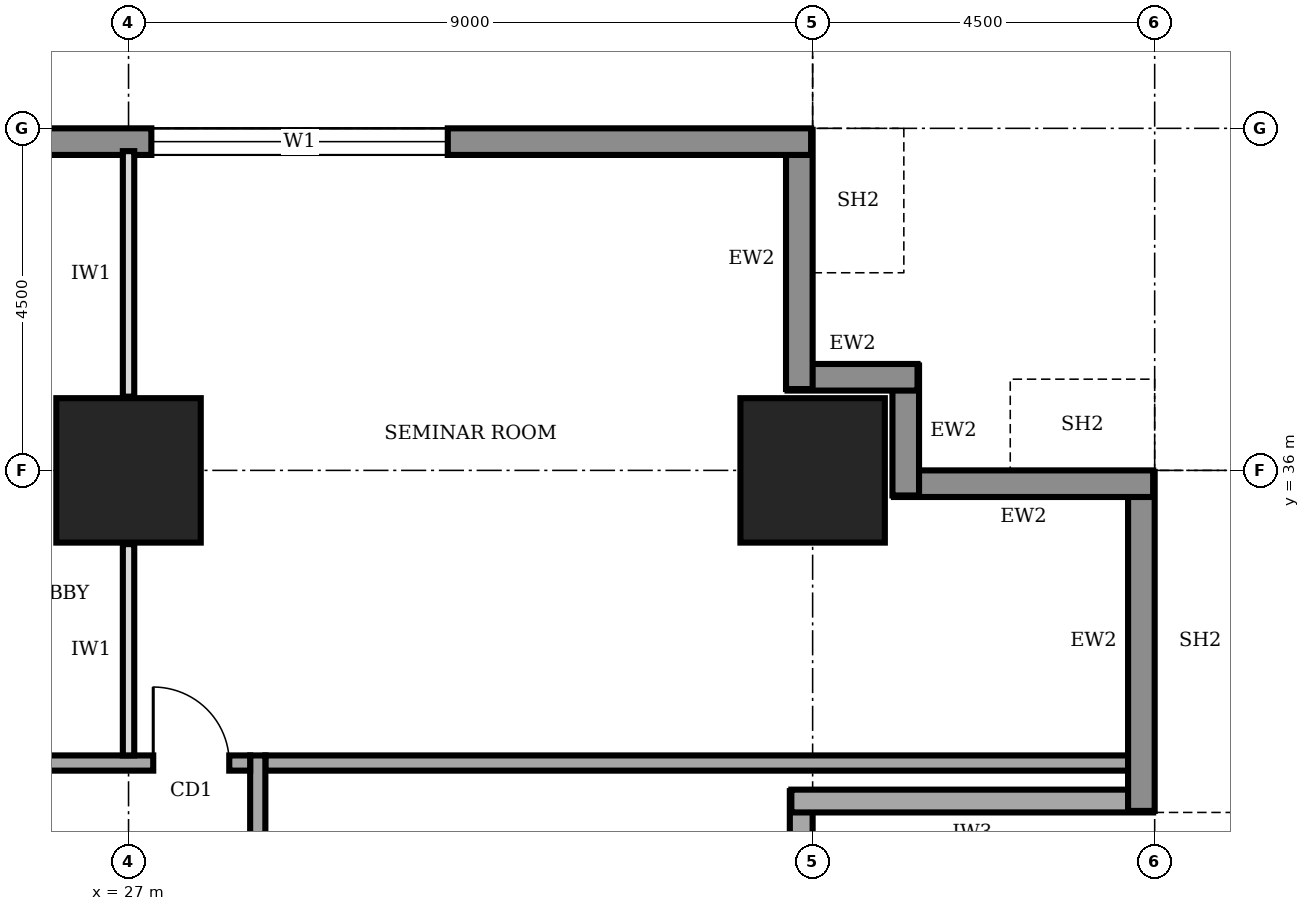
"""IFC4 building model, lengths in metres.
Left out: names, types, materials, properties, quantities, classifications, styles, units other than length and angle.
Written with IfcOpenShell. Run it as: python <this file> out.ifc"""

import sys

from ifc_helpers import new_model, si_unit, direction, frame, frame_2d, origin, origin_2d, place, context, subcontext, project, spatial, rectangle, extrude, element, fill, save


model = new_model("IFC4")
c1 = context("Model", 3, precision=1e-05, world=origin(), true_north=direction((0.0, 1.0)))
c2 = subcontext(c1, "Body", "Model", "MODEL_VIEW")
j1 = project(units=[si_unit("LENGTHUNIT", "METRE"), si_unit("PLANEANGLEUNIT", "RADIAN")], contexts=[c1])
p1 = place(None, origin())
s1 = spatial("IfcSite", under=j1, at=p1, CompositionType="ELEMENT")
p2 = place(p1, origin())
s2 = spatial("IfcBuilding", under=s1, at=p2, CompositionType="ELEMENT")
p3 = place(p2, frame((0.0, 0.0, 113.0)))
s3 = spatial("IfcBuildingStorey", under=s2, at=p3, CompositionType="ELEMENT", Elevation=113.0)
for number, where, z_axis, x_axis in (
    (1, (27.0, 36.0, 0.0), (0.0, 0.0, 1.0), (1.0, 0.0, 0.0)),
    (2, (36.0, 36.0, 0.0), (0.0, 0.0, 1.0), (1.0, 0.0, 0.0)),
):
    element("IfcColumn", number, at=place(p3, frame(where, z_axis=z_axis, x_axis=x_axis)), inside=s3, PredefinedType="COLUMN", context=c2, shape_type="SweptSolid", body=[
        extrude(rectangle(XDim=1.9, YDim=1.9, at=origin_2d()), origin(), (0.0, 0.0, 1.0), 4.0),
    ])
p4 = place(p3, frame((35.85, 30.4, 0.0), z_axis=(0.0, 0.0, 1.0), x_axis=(0.0, 1.0, 0.0)))
e3 = element("IfcWall", 3, at=p4, inside=s3, PredefinedType="SOLIDWALL", context=c2, shape_type="SweptSolid", body=[
    extrude(rectangle(XDim=1.38, YDim=0.3, at=frame_2d((0.69, 0.0))), origin(), (0.0, 0.0, 1.0), 2.65),
])
p5 = place(p3, frame((35.72, 31.65, 0.0), z_axis=(0.0, 0.0, 1.0), x_axis=(1.0, 0.0, 0.0)))
e4 = element("IfcWall", 4, at=p5, inside=s3, PredefinedType="SOLIDWALL", context=c2, shape_type="SweptSolid", body=[
    extrude(rectangle(XDim=4.76, YDim=0.3, at=frame_2d((2.38, 0.0))), origin(), (0.0, 0.0, 1.0), 3.75),
])
p6 = place(p3, frame((40.325, 31.52, 0.0), z_axis=(0.0, 0.0, 1.0), x_axis=(0.0, 1.0, 0.0)))
e5 = element("IfcWall", 5, at=p6, inside=s3, PredefinedType="STANDARD", context=c2, shape_type="SweptSolid", body=[
    extrude(rectangle(XDim=4.46, YDim=0.35, at=frame_2d((2.23, 0.0))), origin(), (0.0, 0.0, 1.0), 3.75),
])
p7 = place(p3, frame((40.48, 35.825, 0.0), z_axis=(0.0, 0.0, 1.0), x_axis=(-1.0, 0.0, 0.0)))
e6 = element("IfcWall", 6, at=p7, inside=s3, PredefinedType="STANDARD", context=c2, shape_type="SweptSolid", body=[
    extrude(rectangle(XDim=3.41, YDim=0.35, at=frame_2d((1.705, 0.0))), origin(), (0.0, 0.0, 1.0), 2.85),
])
for number, where, z_axis, x_axis in (
    (7, (37.225, 35.67, 0.0), (0.0, 0.0, 1.0), (0.0, 1.0, 0.0)),
    (8, (37.38, 37.225, 0.0), (0.0, 0.0, 1.0), (-1.0, 0.0, 0.0)),
):
    element("IfcWall", number, at=place(p3, frame(where, z_axis=z_axis, x_axis=x_axis)), inside=s3, PredefinedType="STANDARD", context=c2, shape_type="SweptSolid", body=[
        extrude(rectangle(XDim=1.71, YDim=0.35, at=frame_2d((0.855, 0.0))), origin(), (0.0, 0.0, 1.0), 3.75),
    ])
p8 = place(p3, frame((35.825, 37.07, 0.0), z_axis=(0.0, 0.0, 1.0), x_axis=(0.0, 1.0, 0.0)))
e9 = element("IfcWall", 9, at=p8, inside=s3, PredefinedType="STANDARD", context=c2, shape_type="SweptSolid", body=[
    extrude(rectangle(XDim=3.41, YDim=0.35, at=frame_2d((1.705, 0.0))), origin(), (0.0, 0.0, 1.0), 2.85),
])
p9 = place(p3, frame((35.98, 40.325, 0.0), z_axis=(0.0, 0.0, 1.0), x_axis=(-1.0, 0.0, 0.0)))
e10 = element("IfcWall", 10, at=p9, inside=s3, PredefinedType="STANDARD", context=c2, shape_type="SweptSolid", body=[
    extrude(rectangle(XDim=31.46, YDim=0.35, at=frame_2d((15.73, 0.0))), origin(), (0.0, 0.0, 1.0), 3.75),
])
p10 = place(p9, frame((27.21, 0.0, 0.9)))
e11 = element("IfcOpeningElement", 11, at=p10, cuts=e10, PredefinedType="OPENING", context=c2, shape_type="SweptSolid", body=[
    extrude(rectangle(XDim=3.9, YDim=2.2, at=frame_2d((1.95, 1.1))), frame((0.0, 0.185, 0.0), z_axis=(0.0, -1.0, 0.0), x_axis=(1.0, 0.0, 0.0)), (0.0, 0.0, 1.0), 0.37),
])
p11 = place(p9, frame((22.78, 0.0, 0.9)))
e12 = element("IfcOpeningElement", 12, at=p11, cuts=e10, PredefinedType="OPENING", context=c2, shape_type="SweptSolid", body=[
    extrude(rectangle(XDim=3.9, YDim=2.2, at=frame_2d((1.95, 1.1))), frame((0.0, 0.185, 0.0), z_axis=(0.0, -1.0, 0.0), x_axis=(1.0, 0.0, 0.0)), (0.0, 0.0, 1.0), 0.37),
])
p12 = place(p9, frame((4.78, 0.0, 0.9)))
e13 = element("IfcOpeningElement", 13, at=p12, cuts=e10, PredefinedType="OPENING", context=c2, shape_type="SweptSolid", body=[
    extrude(rectangle(XDim=3.9, YDim=2.2, at=frame_2d((1.95, 1.1))), frame((0.0, 0.185, 0.0), z_axis=(0.0, -1.0, 0.0), x_axis=(1.0, 0.0, 0.0)), (0.0, 0.0, 1.0), 0.37),
])
p13 = place(p3, frame((28.7, 8.45, 0.0), z_axis=(0.0, 0.0, 1.0), x_axis=(0.0, 1.0, 0.0)))
e14 = element("IfcWall", 14, at=p13, inside=s3, PredefinedType="SOLIDWALL", context=c2, shape_type="SweptSolid", body=[
    extrude(rectangle(XDim=23.8, YDim=0.2, at=frame_2d((11.9, 0.0))), origin(), (0.0, 0.0, 1.0), 3.75),
])
p14 = place(p13, frame((10.9, 0.0, 0.0)))
e15 = element("IfcOpeningElement", 15, at=p14, cuts=e14, PredefinedType="OPENING", context=c2, shape_type="SweptSolid", body=[
    extrude(rectangle(XDim=1.8, YDim=2.1, at=frame_2d((0.9, 1.05))), frame((0.0, 0.11, 0.0), z_axis=(0.0, -1.0, 0.0), x_axis=(1.0, 0.0, 0.0)), (0.0, 0.0, 1.0), 0.22),
])
p15 = place(p3, frame((28.6, 32.15, 0.0), z_axis=(0.0, 0.0, 1.0), x_axis=(-1.0, 0.0, 0.0)))
e16 = element("IfcWall", 16, at=p15, inside=s3, PredefinedType="SOLIDWALL", context=c2, shape_type="SweptSolid", body=[
    extrude(rectangle(XDim=16.9, YDim=0.2, at=frame_2d((8.45, 0.0))), origin(), (0.0, 0.0, 1.0), 3.75),
])
p16 = place(p15, frame((15.425, 0.0, 0.0)))
e17 = element("IfcOpeningElement", 17, at=p16, cuts=e16, PredefinedType="OPENING", context=c2, shape_type="SweptSolid", body=[
    extrude(rectangle(XDim=1.0, YDim=2.1, at=frame_2d((0.5, 1.05))), frame((0.0, 0.11, 0.0), z_axis=(0.0, -1.0, 0.0), x_axis=(1.0, 0.0, 0.0)), (0.0, 0.0, 1.0), 0.22),
])
p17 = place(p15, frame((12.35, 0.0, 0.0)))
e18 = element("IfcOpeningElement", 18, at=p17, cuts=e16, PredefinedType="OPENING", context=c2, shape_type="SweptSolid", body=[
    extrude(rectangle(XDim=1.0, YDim=2.1, at=frame_2d((0.5, 1.05))), frame((0.0, 0.11, 0.0), z_axis=(0.0, -1.0, 0.0), x_axis=(1.0, 0.0, 0.0)), (0.0, 0.0, 1.0), 0.22),
])
p18 = place(p15, frame((5.6, 0.0, 0.0)))
e19 = element("IfcOpeningElement", 19, at=p18, cuts=e16, PredefinedType="OPENING", context=c2, shape_type="SweptSolid", body=[
    extrude(rectangle(XDim=1.0, YDim=2.1, at=frame_2d((0.5, 1.05))), frame((0.0, 0.11, 0.0), z_axis=(0.0, -1.0, 0.0), x_axis=(1.0, 0.0, 0.0)), (0.0, 0.0, 1.0), 0.22),
])
p19 = place(p15, frame((0.275, 0.0, 0.0)))
e20 = element("IfcOpeningElement", 20, at=p19, cuts=e16, PredefinedType="OPENING", context=c2, shape_type="SweptSolid", body=[
    extrude(rectangle(XDim=1.0, YDim=2.1, at=frame_2d((0.5, 1.05))), frame((0.0, 0.11, 0.0), z_axis=(0.0, -1.0, 0.0), x_axis=(1.0, 0.0, 0.0)), (0.0, 0.0, 1.0), 0.22),
])
p20 = place(p3, frame((28.8, 32.15, 0.0), z_axis=(0.0, 0.0, 1.0), x_axis=(1.0, 0.0, 0.0)))
e21 = element("IfcWall", 21, at=p20, inside=s3, PredefinedType="SOLIDWALL", context=c2, shape_type="SweptSolid", body=[
    extrude(rectangle(XDim=11.4, YDim=0.2, at=frame_2d((5.7, 0.0))), origin(), (0.0, 0.0, 1.0), 3.75),
])
p21 = place(p3, frame((27.0, 32.25, 0.0), z_axis=(0.0, 0.0, 1.0), x_axis=(0.0, 1.0, 0.0)))
e22 = element("IfcWall", 22, at=p21, inside=s3, PredefinedType="PARTITIONING", context=c2, shape_type="SweptSolid", body=[
    extrude(rectangle(XDim=2.78, YDim=0.15, at=frame_2d((1.39, 0.0))), origin(), (0.0, 0.0, 1.0), 2.85),
])
p22 = place(p3, frame((27.0, 36.97, 0.0), z_axis=(0.0, 0.0, 1.0), x_axis=(0.0, 1.0, 0.0)))
e23 = element("IfcWall", 23, at=p22, inside=s3, PredefinedType="PARTITIONING", context=c2, shape_type="SweptSolid", body=[
    extrude(rectangle(XDim=3.23, YDim=0.15, at=frame_2d((1.615, 0.0))), origin(), (0.0, 0.0, 1.0), 2.85),
])
p23 = place(p12, origin())
e24 = element("IfcWindow", 24, at=p23, inside=s3, PartitioningType="SINGLE_PANEL", PredefinedType="WINDOW", context=c2, shape_type="SweptSolid", body=[
    extrude(rectangle(XDim=3.9, YDim=2.2, at=frame_2d((1.95, 1.1))), frame((0.0, 0.03, 0.0), z_axis=(0.0, -1.0, 0.0), x_axis=(1.0, 0.0, 0.0)), (0.0, 0.0, 1.0), 0.06),
])
fill(e13, e24)
p24 = place(p19, frame((1.0, 0.0, 0.0), z_axis=(0.0, 0.0, 1.0), x_axis=(-1.0, 0.0, 0.0)))
e25 = element("IfcDoor", 25, at=p24, inside=s3, OperationType="SINGLE_SWING_LEFT", PredefinedType="DOOR", context=c2, shape_type="SweptSolid", body=[
    extrude(rectangle(XDim=1.0, YDim=2.1, at=frame_2d((0.5, 1.05))), frame((0.0, 0.025, 0.0), z_axis=(0.0, -1.0, 0.0), x_axis=(1.0, 0.0, 0.0)), (0.0, 0.0, 1.0), 0.05),
])
fill(e20, e25)
save(model, sys.argv[1])
